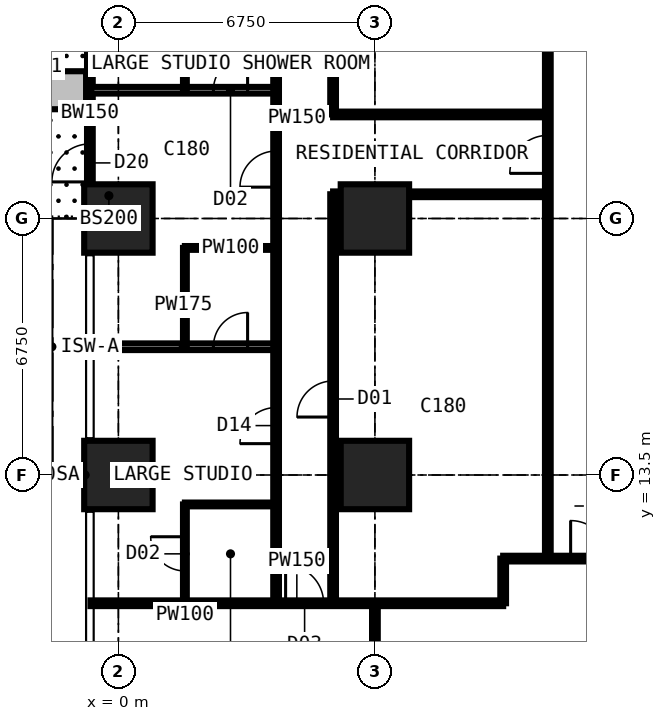
"""IFC4 building model, lengths in metres.
Left out: names, types, materials, properties, quantities, classifications, styles, units other than length and angle.
Written with IfcOpenShell. Run it as: python <this file> out.ifc"""

import sys

from ifc_helpers import new_model, si_unit, direction, frame, frame_2d, origin, origin_2d, place, context, subcontext, project, spatial, rectangle, extrude, element, fill, save


model = new_model("IFC4")
c1 = context("Model", 3, precision=1e-05, world=origin(), true_north=direction((0.0, 1.0)))
c2 = subcontext(c1, "Body", "Model", "MODEL_VIEW")
j1 = project(units=[si_unit("LENGTHUNIT", "METRE"), si_unit("PLANEANGLEUNIT", "RADIAN")], contexts=[c1])
p1 = place(None, origin())
s1 = spatial("IfcSite", under=j1, at=p1, CompositionType="ELEMENT")
p2 = place(p1, origin())
s2 = spatial("IfcBuilding", under=s1, at=p2, CompositionType="ELEMENT")
p3 = place(p2, frame((0.0, 0.0, 50.4)))
s3 = spatial("IfcBuildingStorey", under=s2, at=p3, CompositionType="ELEMENT", Elevation=50.4)
for number, where, z_axis, x_axis in (
    (1, (0.0, 13.5, 0.0), (0.0, 0.0, 1.0), (1.0, 0.0, 0.0)),
    (2, (0.0, 20.25, 0.0), (0.0, 0.0, 1.0), (1.0, 0.0, 0.0)),
    (3, (6.75, 13.5, 0.0), (0.0, 0.0, 1.0), (1.0, 0.0, 0.0)),
    (4, (6.75, 20.25, 0.0), (0.0, 0.0, 1.0), (1.0, 0.0, 0.0)),
):
    element("IfcColumn", number, at=place(p3, frame(where, z_axis=z_axis, x_axis=x_axis)), inside=s3, PredefinedType="COLUMN", context=c2, shape_type="SweptSolid", body=[
        extrude(rectangle(XDim=1.8, YDim=1.8, at=origin_2d()), origin(), (0.0, 0.0, 1.0), 3.6),
    ])
p4 = place(p3, frame((-0.75, 20.25, 0.0), z_axis=(0.0, 0.0, 1.0), x_axis=(0.0, 1.0, 0.0)))
e5 = element("IfcWall", 5, at=p4, inside=s3, PredefinedType="SOLIDWALL", context=c2, shape_type="SweptSolid", body=[
    extrude(rectangle(XDim=6.75, YDim=0.15, at=frame_2d((3.375, 0.0))), origin(), (0.0, 0.0, 1.0), 3.375),
])
p5 = place(p4, frame((0.962, 0.0, 0.0)))
e6 = element("IfcOpeningElement", 6, at=p5, cuts=e5, PredefinedType="OPENING", context=c2, shape_type="SweptSolid", body=[
    extrude(rectangle(XDim=1.0, YDim=2.2, at=frame_2d((0.5, 1.1))), frame((0.0, 0.085, 0.0), z_axis=(0.0, -1.0, 0.0), x_axis=(1.0, 0.0, 0.0)), (0.0, 0.0, 1.0), 0.17),
])
p6 = place(p4, frame((2.025, 0.0, 0.9)))
e7 = element("IfcOpeningElement", 7, at=p6, cuts=e5, PredefinedType="OPENING", context=c2, shape_type="SweptSolid", body=[
    extrude(rectangle(XDim=1.2, YDim=1.8, at=frame_2d((0.6, 0.9))), frame((0.0, 0.085, 0.0), z_axis=(0.0, -1.0, 0.0), x_axis=(1.0, 0.0, 0.0)), (0.0, 0.0, 1.0), 0.17),
])
p7 = place(p4, frame((4.788, 0.0, 0.0)))
e8 = element("IfcOpeningElement", 8, at=p7, cuts=e5, PredefinedType="OPENING", context=c2, shape_type="SweptSolid", body=[
    extrude(rectangle(XDim=1.0, YDim=2.2, at=frame_2d((0.5, 1.1))), frame((0.0, 0.085, 0.0), z_axis=(0.0, -1.0, 0.0), x_axis=(1.0, 0.0, 0.0)), (0.0, 0.0, 1.0), 0.17),
])
p8 = place(p4, frame((3.525, 0.0, 0.9)))
e9 = element("IfcOpeningElement", 9, at=p8, cuts=e5, PredefinedType="OPENING", context=c2, shape_type="SweptSolid", body=[
    extrude(rectangle(XDim=1.2, YDim=1.8, at=frame_2d((0.6, 0.9))), frame((0.0, 0.085, 0.0), z_axis=(0.0, -1.0, 0.0), x_axis=(1.0, 0.0, 0.0)), (0.0, 0.0, 1.0), 0.17),
])
p9 = place(p3, frame((-0.85, 23.625, 0.0), z_axis=(0.0, 0.0, 1.0), x_axis=(-1.0, 0.0, 0.0)))
e10 = element("IfcWall", 10, at=p9, inside=s3, PredefinedType="USERDEFINED", context=c2, shape_type="SweptSolid", body=[
    extrude(rectangle(XDim=2.2, YDim=1.0, at=frame_2d((1.1, 0.0))), origin(), (0.0, 0.0, 1.0), 0.9),
])
p10 = place(p3, frame((-0.734, 10.125, 0.0), z_axis=(0.0, 0.0, 1.0), x_axis=(1.0, 0.0, 0.0)))
e11 = element("IfcWall", 11, at=p10, inside=s3, PredefinedType="PARTITIONING", context=c2, shape_type="SweptSolid", body=[
    extrude(rectangle(XDim=10.859, YDim=0.15, at=frame_2d((5.429, 0.0))), origin(), (0.0, 0.0, 1.0), 3.375),
])
p11 = place(p10, frame((5.134, 0.0, 0.0)))
e12 = element("IfcOpeningElement", 12, at=p11, cuts=e11, PredefinedType="OPENING", context=c2, shape_type="SweptSolid", body=[
    extrude(rectangle(XDim=1.0, YDim=2.2, at=frame_2d((0.5, 1.1))), frame((0.0, 0.085, 0.0), z_axis=(0.0, -1.0, 0.0), x_axis=(1.0, 0.0, 0.0)), (0.0, 0.0, 1.0), 0.17),
])
p12 = place(p3, frame((-0.734, 16.875, 0.0), z_axis=(0.0, 0.0, 1.0), x_axis=(1.0, 0.0, 0.0)))
e13 = element("IfcWall", 13, at=p12, inside=s3, PredefinedType="PARTITIONING", context=c2, shape_type="SweptSolid", body=[
    extrude(rectangle(XDim=4.884, YDim=0.175, at=frame_2d((2.442, 0.0))), origin(), (0.0, 0.0, 1.0), 3.375),
])
p13 = place(p12, frame((3.234, 0.0, 0.0)))
e14 = element("IfcOpeningElement", 14, at=p13, cuts=e13, PredefinedType="OPENING", context=c2, shape_type="SweptSolid", body=[
    extrude(rectangle(XDim=0.9, YDim=2.2, at=frame_2d((0.45, 1.1))), frame((0.0, 0.097, 0.0), z_axis=(0.0, -1.0, 0.0), x_axis=(1.0, 0.0, 0.0)), (0.0, 0.0, 1.0), 0.195),
])
p14 = place(p3, frame((-0.734, 23.625, 0.0), z_axis=(0.0, 0.0, 1.0), x_axis=(1.0, 0.0, 0.0)))
e15 = element("IfcWall", 15, at=p14, inside=s3, PredefinedType="PARTITIONING", context=c2, shape_type="SweptSolid", body=[
    extrude(rectangle(XDim=4.884, YDim=0.175, at=frame_2d((2.442, 0.0))), origin(), (0.0, 0.0, 1.0), 3.375),
])
p15 = place(p14, frame((3.234, 0.0, 0.0)))
e16 = element("IfcOpeningElement", 16, at=p15, cuts=e15, PredefinedType="OPENING", context=c2, shape_type="SweptSolid", body=[
    extrude(rectangle(XDim=0.9, YDim=2.2, at=frame_2d((0.45, 1.1))), frame((0.0, 0.097, 0.0), z_axis=(0.0, -1.0, 0.0), x_axis=(1.0, 0.0, 0.0)), (0.0, 0.0, 1.0), 0.195),
])
p16 = place(p3, frame((1.75, 10.125, 0.0), z_axis=(0.0, 0.0, 1.0), x_axis=(0.0, 1.0, 0.0)))
e17 = element("IfcWall", 17, at=p16, inside=s3, PredefinedType="PARTITIONING", context=c2, shape_type="SweptSolid", body=[
    extrude(rectangle(XDim=2.6, YDim=0.1, at=frame_2d((1.3, 0.0))), origin(), (0.0, 0.0, 1.0), 3.375),
])
p17 = place(p16, frame((0.85, 0.0, 0.0)))
e18 = element("IfcOpeningElement", 18, at=p17, cuts=e17, PredefinedType="OPENING", context=c2, shape_type="SweptSolid", body=[
    extrude(rectangle(XDim=0.9, YDim=2.2, at=frame_2d((0.45, 1.1))), frame((0.0, 0.06, 0.0), z_axis=(0.0, -1.0, 0.0), x_axis=(1.0, 0.0, 0.0)), (0.0, 0.0, 1.0), 0.12),
])
p18 = place(p3, frame((1.75, 12.725, 0.0), z_axis=(0.0, 0.0, 1.0), x_axis=(1.0, 0.0, 0.0)))
e19 = element("IfcWall", 19, at=p18, inside=s3, PredefinedType="PARTITIONING", context=c2, shape_type="SweptSolid", body=[
    extrude(rectangle(XDim=2.4, YDim=0.1, at=frame_2d((1.2, 0.0))), origin(), (0.0, 0.0, 1.0), 3.375),
])
p19 = place(p3, frame((1.75, 16.875, 0.0), z_axis=(0.0, 0.0, 1.0), x_axis=(0.0, 1.0, 0.0)))
e20 = element("IfcWall", 20, at=p19, inside=s3, PredefinedType="PARTITIONING", context=c2, shape_type="SweptSolid", body=[
    extrude(rectangle(XDim=2.6, YDim=0.1, at=frame_2d((1.3, 0.0))), origin(), (0.0, 0.0, 1.0), 3.375),
])
p20 = place(p3, frame((1.75, 19.475, 0.0), z_axis=(0.0, 0.0, 1.0), x_axis=(1.0, 0.0, 0.0)))
e21 = element("IfcWall", 21, at=p20, inside=s3, PredefinedType="PARTITIONING", context=c2, shape_type="SweptSolid", body=[
    extrude(rectangle(XDim=2.4, YDim=0.1, at=frame_2d((1.2, 0.0))), origin(), (0.0, 0.0, 1.0), 3.375),
])
p21 = place(p3, frame((1.75, 23.625, 0.0), z_axis=(0.0, 0.0, 1.0), x_axis=(0.0, 1.0, 0.0)))
e22 = element("IfcWall", 22, at=p21, inside=s3, PredefinedType="PARTITIONING", context=c2, shape_type="SweptSolid", body=[
    extrude(rectangle(XDim=2.6, YDim=0.1, at=frame_2d((1.3, 0.0))), origin(), (0.0, 0.0, 1.0), 3.375),
])
p22 = place(p3, frame((4.15, 10.125, 0.0), z_axis=(0.0, 0.0, 1.0), x_axis=(0.0, 1.0, 0.0)))
e23 = element("IfcWall", 23, at=p22, inside=s3, PredefinedType="PARTITIONING", context=c2, shape_type="SweptSolid", body=[
    extrude(rectangle(XDim=23.625, YDim=0.15, at=frame_2d((11.812, 0.0))), origin(), (0.0, 0.0, 1.0), 3.375),
])
p23 = place(p22, frame((4.2, 0.0, 0.0)))
e24 = element("IfcOpeningElement", 24, at=p23, cuts=e23, PredefinedType="OPENING", context=c2, shape_type="SweptSolid", body=[
    extrude(rectangle(XDim=0.95, YDim=2.2, at=frame_2d((0.475, 1.1))), frame((0.0, 0.085, 0.0), z_axis=(0.0, -1.0, 0.0), x_axis=(1.0, 0.0, 0.0)), (0.0, 0.0, 1.0), 0.17),
])
p24 = place(p22, frame((10.95, 0.0, 0.0)))
e25 = element("IfcOpeningElement", 25, at=p24, cuts=e23, PredefinedType="OPENING", context=c2, shape_type="SweptSolid", body=[
    extrude(rectangle(XDim=0.95, YDim=2.2, at=frame_2d((0.475, 1.1))), frame((0.0, 0.085, 0.0), z_axis=(0.0, -1.0, 0.0), x_axis=(1.0, 0.0, 0.0)), (0.0, 0.0, 1.0), 0.17),
])
p25 = place(p22, frame((17.7, 0.0, 0.0)))
e26 = element("IfcOpeningElement", 26, at=p25, cuts=e23, PredefinedType="OPENING", context=c2, shape_type="SweptSolid", body=[
    extrude(rectangle(XDim=0.95, YDim=2.2, at=frame_2d((0.475, 1.1))), frame((0.0, 0.085, 0.0), z_axis=(0.0, -1.0, 0.0), x_axis=(1.0, 0.0, 0.0)), (0.0, 0.0, 1.0), 0.17),
])
p26 = place(p22, frame((20.5, 0.0, 0.0)))
e27 = element("IfcOpeningElement", 27, at=p26, cuts=e23, PredefinedType="OPENING", context=c2, shape_type="SweptSolid", body=[
    extrude(rectangle(XDim=0.95, YDim=2.2, at=frame_2d((0.475, 1.1))), frame((0.0, 0.085, 0.0), z_axis=(0.0, -1.0, 0.0), x_axis=(1.0, 0.0, 0.0)), (0.0, 0.0, 1.0), 0.17),
])
p27 = place(p3, frame((5.65, 10.125, 0.0), z_axis=(0.0, 0.0, 1.0), x_axis=(0.0, 1.0, 0.0)))
e28 = element("IfcWall", 28, at=p27, inside=s3, PredefinedType="PARTITIONING", context=c2, shape_type="SweptSolid", body=[
    extrude(rectangle(XDim=10.762, YDim=0.15, at=frame_2d((5.381, 0.0))), origin(), (0.0, 0.0, 1.0), 3.375),
])
p28 = place(p27, frame((4.9, 0.0, 0.0)))
e29 = element("IfcOpeningElement", 29, at=p28, cuts=e28, PredefinedType="OPENING", context=c2, shape_type="SweptSolid", body=[
    extrude(rectangle(XDim=0.95, YDim=2.2, at=frame_2d((0.475, 1.1))), frame((0.0, 0.085, 0.0), z_axis=(0.0, -1.0, 0.0), x_axis=(1.0, 0.0, 0.0)), (0.0, 0.0, 1.0), 0.17),
])
p29 = place(p3, frame((5.65, 20.887, 0.0), z_axis=(0.0, 0.0, 1.0), x_axis=(1.0, 0.0, 0.0)))
e30 = element("IfcWall", 30, at=p29, inside=s3, PredefinedType="PARTITIONING", context=c2, shape_type="SweptSolid", body=[
    extrude(rectangle(XDim=5.65, YDim=0.15, at=frame_2d((2.825, 0.0))), origin(), (0.0, 0.0, 1.0), 3.375),
])
p30 = place(p3, frame((5.65, 22.988, 0.0), z_axis=(0.0, 0.0, 1.0), x_axis=(0.0, 1.0, 0.0)))
e31 = element("IfcWall", 31, at=p30, inside=s3, PredefinedType="PARTITIONING", context=c2, shape_type="SweptSolid", body=[
    extrude(rectangle(XDim=8.312, YDim=0.15, at=frame_2d((4.156, 0.0))), origin(), (0.0, 0.0, 1.0), 3.375),
])
p31 = place(p30, frame((4.95, 0.0, 0.0)))
e32 = element("IfcOpeningElement", 32, at=p31, cuts=e31, PredefinedType="OPENING", context=c2, shape_type="SweptSolid", body=[
    extrude(rectangle(XDim=0.95, YDim=2.2, at=frame_2d((0.475, 1.1))), frame((0.0, 0.085, 0.0), z_axis=(0.0, -1.0, 0.0), x_axis=(1.0, 0.0, 0.0)), (0.0, 0.0, 1.0), 0.17),
])
p32 = place(p3, frame((5.65, 22.988, 0.0), z_axis=(0.0, 0.0, 1.0), x_axis=(1.0, 0.0, 0.0)))
e33 = element("IfcWall", 33, at=p32, inside=s3, PredefinedType="PARTITIONING", context=c2, shape_type="SweptSolid", body=[
    extrude(rectangle(XDim=5.65, YDim=0.15, at=frame_2d((2.825, 0.0))), origin(), (0.0, 0.0, 1.0), 3.375),
])
p33 = place(p3, frame((6.75, -0.734, 0.0), z_axis=(0.0, 0.0, 1.0), x_axis=(0.0, 1.0, 0.0)))
e34 = element("IfcWall", 34, at=p33, inside=s3, PredefinedType="PARTITIONING", context=c2, shape_type="SweptSolid", body=[
    extrude(rectangle(XDim=10.859, YDim=0.15, at=frame_2d((5.429, 0.0))), origin(), (0.0, 0.0, 1.0), 2.877),
])
p34 = place(p3, frame((10.125, 10.125, 0.0), z_axis=(0.0, 0.0, 1.0), x_axis=(0.0, 1.0, 0.0)))
e35 = element("IfcWall", 35, at=p34, inside=s3, PredefinedType="PARTITIONING", context=c2, shape_type="SweptSolid", body=[
    extrude(rectangle(XDim=1.175, YDim=0.15, at=frame_2d((0.587, 0.0))), origin(), (0.0, 0.0, 1.0), 3.375),
])
p35 = place(p3, frame((10.125, 11.3, 0.0), z_axis=(0.0, 0.0, 1.0), x_axis=(1.0, 0.0, 0.0)))
e36 = element("IfcWall", 36, at=p35, inside=s3, PredefinedType="PARTITIONING", context=c2, shape_type="SweptSolid", body=[
    extrude(rectangle(XDim=20.675, YDim=0.15, at=frame_2d((10.337, 0.0))), origin(), (0.0, 0.0, 1.0), 3.375),
])
p36 = place(p35, frame((1.775, 0.0, 0.0)))
e37 = element("IfcOpeningElement", 37, at=p36, cuts=e36, PredefinedType="OPENING", context=c2, shape_type="SweptSolid", body=[
    extrude(rectangle(XDim=1.0, YDim=2.2, at=frame_2d((0.5, 1.1))), frame((0.0, 0.085, 0.0), z_axis=(0.0, -1.0, 0.0), x_axis=(1.0, 0.0, 0.0)), (0.0, 0.0, 1.0), 0.17),
])
p37 = place(p35, frame((11.312, 0.0, 0.0)))
e38 = element("IfcOpeningElement", 38, at=p37, cuts=e36, PredefinedType="OPENING", context=c2, shape_type="SweptSolid", body=[
    extrude(rectangle(XDim=1.0, YDim=2.2, at=frame_2d((0.5, 1.1))), frame((0.0, 0.085, 0.0), z_axis=(0.0, -1.0, 0.0), x_axis=(1.0, 0.0, 0.0)), (0.0, 0.0, 1.0), 0.17),
])
p38 = place(p3, frame((11.3, 11.3, 0.0), z_axis=(0.0, 0.0, 1.0), x_axis=(0.0, 1.0, 0.0)))
e39 = element("IfcWall", 39, at=p38, inside=s3, PredefinedType="PARTITIONING", context=c2, shape_type="SweptSolid", body=[
    extrude(rectangle(XDim=19.075, YDim=0.15, at=frame_2d((9.538, 0.0))), origin(), (0.0, 0.0, 1.0), 3.375),
])
p39 = place(p38, frame((10.137, 0.0, 0.0)))
e40 = element("IfcOpeningElement", 40, at=p39, cuts=e39, PredefinedType="OPENING", context=c2, shape_type="SweptSolid", body=[
    extrude(rectangle(XDim=1.0, YDim=2.2, at=frame_2d((0.5, 1.1))), frame((0.0, 0.085, 0.0), z_axis=(0.0, -1.0, 0.0), x_axis=(1.0, 0.0, 0.0)), (0.0, 0.0, 1.0), 0.17),
])
p40 = place(p5, origin())
e41 = element("IfcDoor", 41, at=p40, inside=s3, OperationType="SINGLE_SWING_LEFT", PredefinedType="DOOR", context=c2, shape_type="SweptSolid", body=[
    extrude(rectangle(XDim=1.0, YDim=2.2, at=frame_2d((0.5, 1.1))), frame((0.0, 0.025, 0.0), z_axis=(0.0, -1.0, 0.0), x_axis=(1.0, 0.0, 0.0)), (0.0, 0.0, 1.0), 0.05),
])
fill(e6, e41)
p41 = place(p6, origin())
e42 = element("IfcWindow", 42, at=p41, inside=s3, PartitioningType="SINGLE_PANEL", PredefinedType="WINDOW", context=c2, shape_type="SweptSolid", body=[
    extrude(rectangle(XDim=1.2, YDim=1.8, at=frame_2d((0.6, 0.9))), frame((0.0, 0.03, 0.0), z_axis=(0.0, -1.0, 0.0), x_axis=(1.0, 0.0, 0.0)), (0.0, 0.0, 1.0), 0.06),
])
fill(e7, e42)
p42 = place(p8, origin())
e43 = element("IfcWindow", 43, at=p42, inside=s3, PartitioningType="SINGLE_PANEL", PredefinedType="WINDOW", context=c2, shape_type="SweptSolid", body=[
    extrude(rectangle(XDim=1.2, YDim=1.8, at=frame_2d((0.6, 0.9))), frame((0.0, 0.03, 0.0), z_axis=(0.0, -1.0, 0.0), x_axis=(1.0, 0.0, 0.0)), (0.0, 0.0, 1.0), 0.06),
])
fill(e9, e43)
p43 = place(p11, origin())
e44 = element("IfcDoor", 44, at=p43, inside=s3, OperationType="SINGLE_SWING_LEFT", PredefinedType="DOOR", context=c2, shape_type="SweptSolid", body=[
    extrude(rectangle(XDim=1.0, YDim=2.2, at=frame_2d((0.5, 1.1))), frame((0.0, 0.025, 0.0), z_axis=(0.0, -1.0, 0.0), x_axis=(1.0, 0.0, 0.0)), (0.0, 0.0, 1.0), 0.05),
])
fill(e12, e44)
p44 = place(p36, origin())
e45 = element("IfcDoor", 45, at=p44, inside=s3, OperationType="SINGLE_SWING_LEFT", PredefinedType="DOOR", context=c2, shape_type="SweptSolid", body=[
    extrude(rectangle(XDim=1.0, YDim=2.2, at=frame_2d((0.5, 1.1))), frame((0.0, 0.025, 0.0), z_axis=(0.0, -1.0, 0.0), x_axis=(1.0, 0.0, 0.0)), (0.0, 0.0, 1.0), 0.05),
])
fill(e37, e45)
p45 = place(p23, origin())
e46 = element("IfcDoor", 46, at=p45, inside=s3, OperationType="SINGLE_SWING_LEFT", PredefinedType="DOOR", context=c2, shape_type="SweptSolid", body=[
    extrude(rectangle(XDim=0.95, YDim=2.2, at=frame_2d((0.475, 1.1))), frame((0.0, 0.025, 0.0), z_axis=(0.0, -1.0, 0.0), x_axis=(1.0, 0.0, 0.0)), (0.0, 0.0, 1.0), 0.05),
])
fill(e24, e46)
p46 = place(p17, origin())
e47 = element("IfcDoor", 47, at=p46, inside=s3, OperationType="SINGLE_SWING_RIGHT", PredefinedType="DOOR", context=c2, shape_type="SweptSolid", body=[
    extrude(rectangle(XDim=0.9, YDim=2.2, at=frame_2d((0.45, 1.1))), frame((0.0, 0.025, 0.0), z_axis=(0.0, -1.0, 0.0), x_axis=(1.0, 0.0, 0.0)), (0.0, 0.0, 1.0), 0.05),
])
fill(e18, e47)
p47 = place(p24, origin())
e48 = element("IfcDoor", 48, at=p47, inside=s3, OperationType="SINGLE_SWING_LEFT", PredefinedType="DOOR", context=c2, shape_type="SweptSolid", body=[
    extrude(rectangle(XDim=0.95, YDim=2.2, at=frame_2d((0.475, 1.1))), frame((0.0, 0.025, 0.0), z_axis=(0.0, -1.0, 0.0), x_axis=(1.0, 0.0, 0.0)), (0.0, 0.0, 1.0), 0.05),
])
fill(e25, e48)
p48 = place(p13, origin())
e49 = element("IfcDoor", 49, at=p48, inside=s3, OperationType="SINGLE_SWING_RIGHT", PredefinedType="DOOR", context=c2, shape_type="SweptSolid", body=[
    extrude(rectangle(XDim=0.9, YDim=2.2, at=frame_2d((0.45, 1.1))), frame((0.0, 0.025, 0.0), z_axis=(0.0, -1.0, 0.0), x_axis=(1.0, 0.0, 0.0)), (0.0, 0.0, 1.0), 0.05),
])
fill(e14, e49)
p49 = place(p15, origin())
e50 = element("IfcDoor", 50, at=p49, inside=s3, OperationType="SINGLE_SWING_RIGHT", PredefinedType="DOOR", context=c2, shape_type="SweptSolid", body=[
    extrude(rectangle(XDim=0.9, YDim=2.2, at=frame_2d((0.45, 1.1))), frame((0.0, 0.025, 0.0), z_axis=(0.0, -1.0, 0.0), x_axis=(1.0, 0.0, 0.0)), (0.0, 0.0, 1.0), 0.05),
])
fill(e16, e50)
p50 = place(p39, origin())
e51 = element("IfcDoor", 51, at=p50, inside=s3, OperationType="SINGLE_SWING_LEFT", PredefinedType="DOOR", context=c2, shape_type="SweptSolid", body=[
    extrude(rectangle(XDim=1.0, YDim=2.2, at=frame_2d((0.5, 1.1))), frame((0.0, 0.025, 0.0), z_axis=(0.0, -1.0, 0.0), x_axis=(1.0, 0.0, 0.0)), (0.0, 0.0, 1.0), 0.05),
])
fill(e40, e51)
p51 = place(p28, origin())
e52 = element("IfcDoor", 52, at=p51, inside=s3, OperationType="SINGLE_SWING_LEFT", PredefinedType="DOOR", context=c2, shape_type="SweptSolid", body=[
    extrude(rectangle(XDim=0.95, YDim=2.2, at=frame_2d((0.475, 1.1))), frame((0.0, 0.025, 0.0), z_axis=(0.0, -1.0, 0.0), x_axis=(1.0, 0.0, 0.0)), (0.0, 0.0, 1.0), 0.05),
])
fill(e29, e52)
save(model, sys.argv[1])
